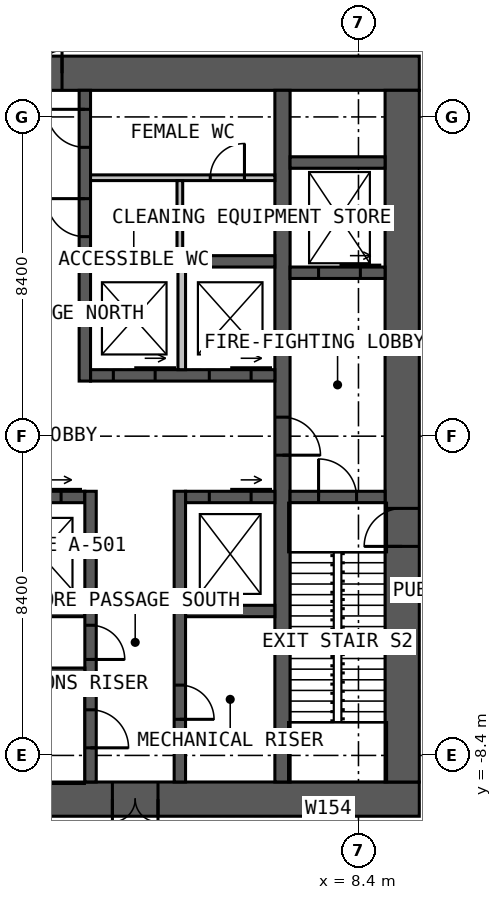
"""IFC4 building model, lengths in metres.
Left out: names, types, materials, properties, quantities, classifications, styles, units other than length and angle.
Written with IfcOpenShell. Run it as: python <this file> out.ifc"""

import sys

from ifc_helpers import new_model, si_unit, direction, frame, frame_2d, origin, place, context, subcontext, project, spatial, rectangle, extrude, element, fill, save


model = new_model("IFC4")
c1 = context("Model", 3, precision=1e-05, world=origin(), true_north=direction((0.0, 1.0)))
c2 = subcontext(c1, "Body", "Model", "MODEL_VIEW")
j1 = project(units=[si_unit("LENGTHUNIT", "METRE"), si_unit("PLANEANGLEUNIT", "RADIAN")], contexts=[c1])
p1 = place(None, origin())
s1 = spatial("IfcSite", under=j1, at=p1, CompositionType="ELEMENT")
p2 = place(p1, origin())
s2 = spatial("IfcBuilding", under=s1, at=p2, CompositionType="ELEMENT")
p3 = place(p2, origin())
s3 = spatial("IfcBuildingStorey", under=s2, at=p3, CompositionType="ELEMENT", Elevation=0.0)
p4 = place(p3, frame((-10.0, 9.55, 0.0), z_axis=(0.0, 0.0, 1.0), x_axis=(1.0, 0.0, 0.0)))
e1 = element("IfcWall", 1, at=p4, inside=s3, PredefinedType="SOLIDWALL", context=c2, shape_type="SweptSolid", body=[
    extrude(rectangle(XDim=20.0, YDim=0.9, at=frame_2d((10.0, 0.0))), origin(), (0.0, 0.0, 1.0), 6.0),
])
p5 = place(p4, frame((9.4, 0.0, 0.0)))
e2 = element("IfcOpeningElement", 2, at=p5, cuts=e1, PredefinedType="OPENING", context=c2, shape_type="SweptSolid", body=[
    extrude(rectangle(XDim=1.2, YDim=2.2, at=frame_2d((0.6, 1.1))), frame((0.0, 0.46, 0.0), z_axis=(0.0, -1.0, 0.0), x_axis=(1.0, 0.0, 0.0)), (0.0, 0.0, 1.0), 0.92),
])
p6 = place(p3, frame((10.0, -9.55, 0.0), z_axis=(0.0, 0.0, 1.0), x_axis=(-1.0, 0.0, 0.0)))
e3 = element("IfcWall", 3, at=p6, inside=s3, PredefinedType="SOLIDWALL", context=c2, shape_type="SweptSolid", body=[
    extrude(rectangle(XDim=20.0, YDim=0.9, at=frame_2d((10.0, 0.0))), origin(), (0.0, 0.0, 1.0), 6.0),
])
p7 = place(p6, frame((6.875, 0.0, 0.0)))
e4 = element("IfcOpeningElement", 4, at=p7, cuts=e3, PredefinedType="OPENING", context=c2, shape_type="SweptSolid", body=[
    extrude(rectangle(XDim=1.2, YDim=2.2, at=frame_2d((0.6, 1.1))), frame((0.0, 0.46, 0.0), z_axis=(0.0, -1.0, 0.0), x_axis=(1.0, 0.0, 0.0)), (0.0, 0.0, 1.0), 0.92),
])
p8 = place(p3, frame((9.55, -9.1, 0.0), z_axis=(0.0, 0.0, 1.0), x_axis=(0.0, 1.0, 0.0)))
e5 = element("IfcWall", 5, at=p8, inside=s3, PredefinedType="SOLIDWALL", context=c2, shape_type="SweptSolid", body=[
    extrude(rectangle(XDim=18.2, YDim=0.9, at=frame_2d((9.1, 0.0))), origin(), (0.0, 0.0, 1.0), 6.0),
])
p9 = place(p8, frame((6.2, 0.0, 0.0)))
e6 = element("IfcOpeningElement", 6, at=p9, cuts=e5, PredefinedType="OPENING", context=c2, shape_type="SweptSolid", body=[
    extrude(rectangle(XDim=1.0, YDim=2.2, at=frame_2d((0.5, 1.1))), frame((0.0, 0.46, 0.0), z_axis=(0.0, -1.0, 0.0), x_axis=(1.0, 0.0, 0.0)), (0.0, 0.0, 1.0), 0.92),
])
p10 = place(p3, frame((6.4, 9.1, 0.0), z_axis=(0.0, 0.0, 1.0), x_axis=(0.0, -1.0, 0.0)))
e7 = element("IfcWall", 7, at=p10, inside=s3, PredefinedType="SOLIDWALL", context=c2, shape_type="SweptSolid", body=[
    extrude(rectangle(XDim=18.2, YDim=0.4, at=frame_2d((9.1, 0.0))), origin(), (0.0, 0.0, 1.0), 6.0),
])
p11 = place(p10, frame((8.6, 0.0, 0.0)))
e8 = element("IfcOpeningElement", 8, at=p11, cuts=e7, PredefinedType="OPENING", context=c2, shape_type="SweptSolid", body=[
    extrude(rectangle(XDim=1.0, YDim=2.2, at=frame_2d((0.5, 1.1))), frame((0.0, 0.21, 0.0), z_axis=(0.0, -1.0, 0.0), x_axis=(1.0, 0.0, 0.0)), (0.0, 0.0, 1.0), 0.42),
])
p12 = place(p3, frame((1.35, 1.6, 0.0), z_axis=(0.0, 0.0, 1.0), x_axis=(1.0, 0.0, 0.0)))
e9 = element("IfcWall", 9, at=p12, inside=s3, PredefinedType="SOLIDWALL", context=c2, shape_type="SweptSolid", body=[
    extrude(rectangle(XDim=4.85, YDim=0.3, at=frame_2d((2.425, 0.0))), origin(), (0.0, 0.0, 1.0), 6.0),
])
p13 = place(p12, frame((0.6, 0.0, 0.0)))
e10 = element("IfcOpeningElement", 10, at=p13, cuts=e9, PredefinedType="OPENING", context=c2, shape_type="SweptSolid", body=[
    extrude(rectangle(XDim=1.1, YDim=2.2, at=frame_2d((0.55, 1.1))), frame((0.0, 0.16, 0.0), z_axis=(0.0, -1.0, 0.0), x_axis=(1.0, 0.0, 0.0)), (0.0, 0.0, 1.0), 0.32),
])
p14 = place(p12, frame((3.125, 0.0, 0.0)))
e11 = element("IfcOpeningElement", 11, at=p14, cuts=e9, PredefinedType="OPENING", context=c2, shape_type="SweptSolid", body=[
    extrude(rectangle(XDim=1.1, YDim=2.2, at=frame_2d((0.55, 1.1))), frame((0.0, 0.16, 0.0), z_axis=(0.0, -1.0, 0.0), x_axis=(1.0, 0.0, 0.0)), (0.0, 0.0, 1.0), 0.32),
])
p15 = place(p3, frame((1.35, 4.6, 0.0), z_axis=(0.0, 0.0, 1.0), x_axis=(1.0, 0.0, 0.0)))
e12 = element("IfcWall", 12, at=p15, inside=s3, PredefinedType="SOLIDWALL", context=c2, shape_type="SweptSolid", body=[
    extrude(rectangle(XDim=4.85, YDim=0.3, at=frame_2d((2.425, 0.0))), origin(), (0.0, 0.0, 1.0), 6.0),
])
p16 = place(p3, frame((1.2, 1.45, 0.0), z_axis=(0.0, 0.0, 1.0), x_axis=(0.0, 1.0, 0.0)))
e13 = element("IfcWall", 13, at=p16, inside=s3, PredefinedType="SOLIDWALL", context=c2, shape_type="SweptSolid", body=[
    extrude(rectangle(XDim=7.65, YDim=0.3, at=frame_2d((3.825, 0.0))), origin(), (0.0, 0.0, 1.0), 6.0),
])
p17 = place(p16, frame((3.8, 0.0, 0.0)))
e14 = element("IfcOpeningElement", 14, at=p17, cuts=e13, PredefinedType="OPENING", context=c2, shape_type="SweptSolid", body=[
    extrude(rectangle(XDim=1.0, YDim=2.2, at=frame_2d((0.5, 1.1))), frame((0.0, 0.16, 0.0), z_axis=(0.0, -1.0, 0.0), x_axis=(1.0, 0.0, 0.0)), (0.0, 0.0, 1.0), 0.32),
])
p18 = place(p16, frame((6.15, 0.0, 0.0)))
e15 = element("IfcOpeningElement", 15, at=p18, cuts=e13, PredefinedType="OPENING", context=c2, shape_type="SweptSolid", body=[
    extrude(rectangle(XDim=1.0, YDim=2.2, at=frame_2d((0.5, 1.1))), frame((0.0, 0.16, 0.0), z_axis=(0.0, -1.0, 0.0), x_axis=(1.0, 0.0, 0.0)), (0.0, 0.0, 1.0), 0.32),
])
p19 = place(p3, frame((-6.2, -1.6, 0.0), z_axis=(0.0, 0.0, 1.0), x_axis=(1.0, 0.0, 0.0)))
e16 = element("IfcWall", 16, at=p19, inside=s3, PredefinedType="SOLIDWALL", context=c2, shape_type="SweptSolid", body=[
    extrude(rectangle(XDim=7.4, YDim=0.3, at=frame_2d((3.7, 0.0))), origin(), (0.0, 0.0, 1.0), 6.0),
])
p20 = place(p19, frame((0.625, 0.0, 0.0)))
e17 = element("IfcOpeningElement", 17, at=p20, cuts=e16, PredefinedType="OPENING", context=c2, shape_type="SweptSolid", body=[
    extrude(rectangle(XDim=1.1, YDim=2.2, at=frame_2d((0.55, 1.1))), frame((0.0, 0.16, 0.0), z_axis=(0.0, -1.0, 0.0), x_axis=(1.0, 0.0, 0.0)), (0.0, 0.0, 1.0), 0.32),
])
p21 = place(p19, frame((3.15, 0.0, 0.0)))
e18 = element("IfcOpeningElement", 18, at=p21, cuts=e16, PredefinedType="OPENING", context=c2, shape_type="SweptSolid", body=[
    extrude(rectangle(XDim=1.1, YDim=2.2, at=frame_2d((0.55, 1.1))), frame((0.0, 0.16, 0.0), z_axis=(0.0, -1.0, 0.0), x_axis=(1.0, 0.0, 0.0)), (0.0, 0.0, 1.0), 0.32),
])
p22 = place(p19, frame((5.675, 0.0, 0.0)))
e19 = element("IfcOpeningElement", 19, at=p22, cuts=e16, PredefinedType="OPENING", context=c2, shape_type="SweptSolid", body=[
    extrude(rectangle(XDim=1.1, YDim=2.2, at=frame_2d((0.55, 1.1))), frame((0.0, 0.16, 0.0), z_axis=(0.0, -1.0, 0.0), x_axis=(1.0, 0.0, 0.0)), (0.0, 0.0, 1.0), 0.32),
])
p23 = place(p3, frame((3.85, -1.6, 0.0), z_axis=(0.0, 0.0, 1.0), x_axis=(1.0, 0.0, 0.0)))
e20 = element("IfcWall", 20, at=p23, inside=s3, PredefinedType="SOLIDWALL", context=c2, shape_type="SweptSolid", body=[
    extrude(rectangle(XDim=2.35, YDim=0.3, at=frame_2d((1.175, 0.0))), origin(), (0.0, 0.0, 1.0), 6.0),
])
p24 = place(p23, frame((0.625, 0.0, 0.0)))
e21 = element("IfcOpeningElement", 21, at=p24, cuts=e20, PredefinedType="OPENING", context=c2, shape_type="SweptSolid", body=[
    extrude(rectangle(XDim=1.1, YDim=2.2, at=frame_2d((0.55, 1.1))), frame((0.0, 0.16, 0.0), z_axis=(0.0, -1.0, 0.0), x_axis=(1.0, 0.0, 0.0)), (0.0, 0.0, 1.0), 0.32),
])
p25 = place(p3, frame((-6.2, -4.6, 0.0), z_axis=(0.0, 0.0, 1.0), x_axis=(1.0, 0.0, 0.0)))
e22 = element("IfcWall", 22, at=p25, inside=s3, PredefinedType="SOLIDWALL", context=c2, shape_type="SweptSolid", body=[
    extrude(rectangle(XDim=7.4, YDim=0.3, at=frame_2d((3.7, 0.0))), origin(), (0.0, 0.0, 1.0), 6.0),
])
p26 = place(p3, frame((3.85, -4.6, 0.0), z_axis=(0.0, 0.0, 1.0), x_axis=(1.0, 0.0, 0.0)))
e23 = element("IfcWall", 23, at=p26, inside=s3, PredefinedType="SOLIDWALL", context=c2, shape_type="SweptSolid", body=[
    extrude(rectangle(XDim=2.35, YDim=0.3, at=frame_2d((1.175, 0.0))), origin(), (0.0, 0.0, 1.0), 6.0),
])
p27 = place(p3, frame((1.35, -1.45, 0.0), z_axis=(0.0, 0.0, 1.0), x_axis=(0.0, -1.0, 0.0)))
e24 = element("IfcWall", 24, at=p27, inside=s3, PredefinedType="SOLIDWALL", context=c2, shape_type="SweptSolid", body=[
    extrude(rectangle(XDim=7.65, YDim=0.3, at=frame_2d((3.825, 0.0))), origin(), (0.0, 0.0, 1.0), 6.0),
])
p28 = place(p27, frame((5.75, 0.0, 0.0)))
e25 = element("IfcOpeningElement", 25, at=p28, cuts=e24, PredefinedType="OPENING", context=c2, shape_type="SweptSolid", body=[
    extrude(rectangle(XDim=1.0, YDim=2.2, at=frame_2d((0.5, 1.1))), frame((0.0, 0.16, 0.0), z_axis=(0.0, -1.0, 0.0), x_axis=(1.0, 0.0, 0.0)), (0.0, 0.0, 1.0), 0.32),
])
p29 = place(p27, frame((3.525, 0.0, 0.0)))
e26 = element("IfcOpeningElement", 26, at=p29, cuts=e24, PredefinedType="OPENING", context=c2, shape_type="SweptSolid", body=[
    extrude(rectangle(XDim=0.9, YDim=2.2, at=frame_2d((0.45, 1.1))), frame((0.0, 0.16, 0.0), z_axis=(0.0, -1.0, 0.0), x_axis=(1.0, 0.0, 0.0)), (0.0, 0.0, 1.0), 0.32),
])
p30 = place(p3, frame((3.7, -1.45, 0.0), z_axis=(0.0, 0.0, 1.0), x_axis=(0.0, -1.0, 0.0)))
e27 = element("IfcWall", 27, at=p30, inside=s3, PredefinedType="SOLIDWALL", context=c2, shape_type="SweptSolid", body=[
    extrude(rectangle(XDim=7.65, YDim=0.3, at=frame_2d((3.825, 0.0))), origin(), (0.0, 0.0, 1.0), 6.0),
])
p31 = place(p30, frame((5.1, 0.0, 0.0)))
e28 = element("IfcOpeningElement", 28, at=p31, cuts=e27, PredefinedType="OPENING", context=c2, shape_type="SweptSolid", body=[
    extrude(rectangle(XDim=0.9, YDim=2.2, at=frame_2d((0.45, 1.1))), frame((0.0, 0.16, 0.0), z_axis=(0.0, -1.0, 0.0), x_axis=(1.0, 0.0, 0.0)), (0.0, 0.0, 1.0), 0.32),
])
p32 = place(p3, frame((-6.2, -6.2, 0.0), z_axis=(0.0, 0.0, 1.0), x_axis=(1.0, 0.0, 0.0)))
e29 = element("IfcWall", 29, at=p32, inside=s3, PredefinedType="SOLIDWALL", context=c2, shape_type="SweptSolid", body=[
    extrude(rectangle(XDim=7.4, YDim=0.2, at=frame_2d((3.7, 0.0))), origin(), (0.0, 0.0, 1.0), 6.0),
])
p33 = place(p3, frame((6.6, -1.6, 0.0), z_axis=(0.0, 0.0, 1.0), x_axis=(1.0, 0.0, 0.0)))
e30 = element("IfcWall", 30, at=p33, inside=s3, PredefinedType="SOLIDWALL", context=c2, shape_type="SweptSolid", body=[
    extrude(rectangle(XDim=2.5, YDim=0.3, at=frame_2d((1.25, 0.0))), origin(), (0.0, 0.0, 1.0), 6.0),
])
p34 = place(p33, frame((0.75, 0.0, 0.0)))
e31 = element("IfcOpeningElement", 31, at=p34, cuts=e30, PredefinedType="OPENING", context=c2, shape_type="SweptSolid", body=[
    extrude(rectangle(XDim=1.0, YDim=2.2, at=frame_2d((0.5, 1.1))), frame((0.0, 0.16, 0.0), z_axis=(0.0, -1.0, 0.0), x_axis=(1.0, 0.0, 0.0)), (0.0, 0.0, 1.0), 0.32),
])
p35 = place(p3, frame((6.6, 4.3, 0.0), z_axis=(0.0, 0.0, 1.0), x_axis=(1.0, 0.0, 0.0)))
e32 = element("IfcWall", 32, at=p35, inside=s3, PredefinedType="SOLIDWALL", context=c2, shape_type="SweptSolid", body=[
    extrude(rectangle(XDim=2.5, YDim=0.3, at=frame_2d((1.25, 0.0))), origin(), (0.0, 0.0, 1.0), 6.0),
])
p36 = place(p35, frame((0.75, 0.0, 0.0)))
e33 = element("IfcOpeningElement", 33, at=p36, cuts=e32, PredefinedType="OPENING", context=c2, shape_type="SweptSolid", body=[
    extrude(rectangle(XDim=1.1, YDim=2.2, at=frame_2d((0.55, 1.1))), frame((0.0, 0.16, 0.0), z_axis=(0.0, -1.0, 0.0), x_axis=(1.0, 0.0, 0.0)), (0.0, 0.0, 1.0), 0.32),
])
p37 = place(p3, frame((6.6, 7.2, 0.0), z_axis=(0.0, 0.0, 1.0), x_axis=(1.0, 0.0, 0.0)))
e34 = element("IfcWall", 34, at=p37, inside=s3, PredefinedType="SOLIDWALL", context=c2, shape_type="SweptSolid", body=[
    extrude(rectangle(XDim=2.5, YDim=0.3, at=frame_2d((1.25, 0.0))), origin(), (0.0, 0.0, 1.0), 6.0),
])
p38 = place(p3, frame((3.75, 1.75, 0.0), z_axis=(0.0, 0.0, 1.0), x_axis=(0.0, 1.0, 0.0)))
e35 = element("IfcWall", 35, at=p38, inside=s3, PredefinedType="SOLIDWALL", context=c2, shape_type="SweptSolid", body=[
    extrude(rectangle(XDim=2.7, YDim=0.2, at=frame_2d((1.35, 0.0))), origin(), (0.0, 0.0, 1.0), 5.75),
])
p39 = place(p3, frame((1.35, 6.8, 0.0), z_axis=(0.0, 0.0, 1.0), x_axis=(1.0, 0.0, 0.0)))
e36 = element("IfcWall", 36, at=p39, inside=s3, PredefinedType="PARTITIONING", context=c2, shape_type="SweptSolid", body=[
    extrude(rectangle(XDim=4.85, YDim=0.15, at=frame_2d((2.425, 0.0))), origin(), (0.0, 0.0, 1.0), 5.75),
])
p40 = place(p39, frame((3.15, 0.0, 0.0)))
e37 = element("IfcOpeningElement", 37, at=p40, cuts=e36, PredefinedType="OPENING", context=c2, shape_type="SweptSolid", body=[
    extrude(rectangle(XDim=0.9, YDim=2.2, at=frame_2d((0.45, 1.1))), frame((0.0, 0.085, 0.0), z_axis=(0.0, -1.0, 0.0), x_axis=(1.0, 0.0, 0.0)), (0.0, 0.0, 1.0), 0.17),
])
p41 = place(p3, frame((3.7, 4.75, 0.0), z_axis=(0.0, 0.0, 1.0), x_axis=(0.0, 1.0, 0.0)))
e38 = element("IfcWall", 38, at=p41, inside=s3, PredefinedType="PARTITIONING", context=c2, shape_type="SweptSolid", body=[
    extrude(rectangle(XDim=1.975, YDim=0.15, at=frame_2d((0.988, 0.0))), origin(), (0.0, 0.0, 1.0), 5.75),
])
p42 = place(p5, origin())
e39 = element("IfcDoor", 39, at=p42, inside=s3, OperationType="DOUBLE_DOOR_SINGLE_SWING", PredefinedType="DOOR", context=c2, shape_type="SweptSolid", body=[
    extrude(rectangle(XDim=1.2, YDim=2.2, at=frame_2d((0.6, 1.1))), frame((0.0, 0.025, 0.0), z_axis=(0.0, -1.0, 0.0), x_axis=(1.0, 0.0, 0.0)), (0.0, 0.0, 1.0), 0.05),
])
fill(e2, e39)
p43 = place(p7, origin())
e40 = element("IfcDoor", 40, at=p43, inside=s3, OperationType="DOUBLE_DOOR_SINGLE_SWING", PredefinedType="DOOR", context=c2, shape_type="SweptSolid", body=[
    extrude(rectangle(XDim=1.2, YDim=2.2, at=frame_2d((0.6, 1.1))), frame((0.0, 0.025, 0.0), z_axis=(0.0, -1.0, 0.0), x_axis=(1.0, 0.0, 0.0)), (0.0, 0.0, 1.0), 0.05),
])
fill(e4, e40)
p44 = place(p11, origin())
e41 = element("IfcDoor", 41, at=p44, inside=s3, OperationType="SINGLE_SWING_RIGHT", PredefinedType="DOOR", context=c2, shape_type="SweptSolid", body=[
    extrude(rectangle(XDim=1.0, YDim=2.2, at=frame_2d((0.5, 1.1))), frame((0.0, 0.025, 0.0), z_axis=(0.0, -1.0, 0.0), x_axis=(1.0, 0.0, 0.0)), (0.0, 0.0, 1.0), 0.05),
])
fill(e8, e41)
p45 = place(p34, origin())
e42 = element("IfcDoor", 42, at=p45, inside=s3, OperationType="SINGLE_SWING_LEFT", PredefinedType="DOOR", context=c2, shape_type="SweptSolid", body=[
    extrude(rectangle(XDim=1.0, YDim=2.2, at=frame_2d((0.5, 1.1))), frame((0.0, 0.025, 0.0), z_axis=(0.0, -1.0, 0.0), x_axis=(1.0, 0.0, 0.0)), (0.0, 0.0, 1.0), 0.05),
])
fill(e31, e42)
p46 = place(p28, origin())
e43 = element("IfcDoor", 43, at=p46, inside=s3, OperationType="SINGLE_SWING_RIGHT", PredefinedType="DOOR", context=c2, shape_type="SweptSolid", body=[
    extrude(rectangle(XDim=1.0, YDim=2.2, at=frame_2d((0.5, 1.1))), frame((0.0, 0.025, 0.0), z_axis=(0.0, -1.0, 0.0), x_axis=(1.0, 0.0, 0.0)), (0.0, 0.0, 1.0), 0.05),
])
fill(e25, e43)
p47 = place(p9, origin())
e44 = element("IfcDoor", 44, at=p47, inside=s3, OperationType="SINGLE_SWING_LEFT", PredefinedType="DOOR", context=c2, shape_type="SweptSolid", body=[
    extrude(rectangle(XDim=1.0, YDim=2.2, at=frame_2d((0.5, 1.1))), frame((0.0, 0.025, 0.0), z_axis=(0.0, -1.0, 0.0), x_axis=(1.0, 0.0, 0.0)), (0.0, 0.0, 1.0), 0.05),
])
fill(e6, e44)
p48 = place(p17, origin())
e45 = element("IfcDoor", 45, at=p48, inside=s3, OperationType="SINGLE_SWING_RIGHT", PredefinedType="DOOR", context=c2, shape_type="SweptSolid", body=[
    extrude(rectangle(XDim=1.0, YDim=2.2, at=frame_2d((0.5, 1.1))), frame((0.0, 0.025, 0.0), z_axis=(0.0, -1.0, 0.0), x_axis=(1.0, 0.0, 0.0)), (0.0, 0.0, 1.0), 0.05),
])
fill(e14, e45)
p49 = place(p18, origin())
e46 = element("IfcDoor", 46, at=p49, inside=s3, OperationType="SINGLE_SWING_RIGHT", PredefinedType="DOOR", context=c2, shape_type="SweptSolid", body=[
    extrude(rectangle(XDim=1.0, YDim=2.2, at=frame_2d((0.5, 1.1))), frame((0.0, 0.025, 0.0), z_axis=(0.0, -1.0, 0.0), x_axis=(1.0, 0.0, 0.0)), (0.0, 0.0, 1.0), 0.05),
])
fill(e15, e46)
p50 = place(p29, origin())
e47 = element("IfcDoor", 47, at=p50, inside=s3, OperationType="SINGLE_SWING_RIGHT", PredefinedType="DOOR", context=c2, shape_type="SweptSolid", body=[
    extrude(rectangle(XDim=0.9, YDim=2.2, at=frame_2d((0.45, 1.1))), frame((0.0, 0.025, 0.0), z_axis=(0.0, -1.0, 0.0), x_axis=(1.0, 0.0, 0.0)), (0.0, 0.0, 1.0), 0.05),
])
fill(e26, e47)
p51 = place(p31, origin())
e48 = element("IfcDoor", 48, at=p51, inside=s3, OperationType="SINGLE_SWING_RIGHT", PredefinedType="DOOR", context=c2, shape_type="SweptSolid", body=[
    extrude(rectangle(XDim=0.9, YDim=2.2, at=frame_2d((0.45, 1.1))), frame((0.0, 0.025, 0.0), z_axis=(0.0, -1.0, 0.0), x_axis=(1.0, 0.0, 0.0)), (0.0, 0.0, 1.0), 0.05),
])
fill(e28, e48)
p52 = place(p40, origin())
e49 = element("IfcDoor", 49, at=p52, inside=s3, OperationType="SINGLE_SWING_RIGHT", PredefinedType="DOOR", context=c2, shape_type="SweptSolid", body=[
    extrude(rectangle(XDim=0.9, YDim=2.2, at=frame_2d((0.45, 1.1))), frame((0.0, 0.025, 0.0), z_axis=(0.0, -1.0, 0.0), x_axis=(1.0, 0.0, 0.0)), (0.0, 0.0, 1.0), 0.05),
])
fill(e37, e49)
p53 = place(p13, origin())
e50 = element("IfcDoor", 50, at=p53, inside=s3, OperationType="SLIDING_TO_LEFT", PredefinedType="DOOR", context=c2, shape_type="SweptSolid", body=[
    extrude(rectangle(XDim=1.1, YDim=2.2, at=frame_2d((0.55, 1.1))), frame((0.0, 0.025, 0.0), z_axis=(0.0, -1.0, 0.0), x_axis=(1.0, 0.0, 0.0)), (0.0, 0.0, 1.0), 0.05),
])
fill(e10, e50)
p54 = place(p14, origin())
e51 = element("IfcDoor", 51, at=p54, inside=s3, OperationType="SLIDING_TO_LEFT", PredefinedType="DOOR", context=c2, shape_type="SweptSolid", body=[
    extrude(rectangle(XDim=1.1, YDim=2.2, at=frame_2d((0.55, 1.1))), frame((0.0, 0.025, 0.0), z_axis=(0.0, -1.0, 0.0), x_axis=(1.0, 0.0, 0.0)), (0.0, 0.0, 1.0), 0.05),
])
fill(e11, e51)
p55 = place(p22, origin())
e52 = element("IfcDoor", 52, at=p55, inside=s3, OperationType="SLIDING_TO_LEFT", PredefinedType="DOOR", context=c2, shape_type="SweptSolid", body=[
    extrude(rectangle(XDim=1.1, YDim=2.2, at=frame_2d((0.55, 1.1))), frame((0.0, 0.025, 0.0), z_axis=(0.0, -1.0, 0.0), x_axis=(1.0, 0.0, 0.0)), (0.0, 0.0, 1.0), 0.05),
])
fill(e19, e52)
p56 = place(p24, origin())
e53 = element("IfcDoor", 53, at=p56, inside=s3, OperationType="SLIDING_TO_LEFT", PredefinedType="DOOR", context=c2, shape_type="SweptSolid", body=[
    extrude(rectangle(XDim=1.1, YDim=2.2, at=frame_2d((0.55, 1.1))), frame((0.0, 0.025, 0.0), z_axis=(0.0, -1.0, 0.0), x_axis=(1.0, 0.0, 0.0)), (0.0, 0.0, 1.0), 0.05),
])
fill(e21, e53)
p57 = place(p36, origin())
e54 = element("IfcDoor", 54, at=p57, inside=s3, OperationType="SLIDING_TO_LEFT", PredefinedType="DOOR", context=c2, shape_type="SweptSolid", body=[
    extrude(rectangle(XDim=1.1, YDim=2.2, at=frame_2d((0.55, 1.1))), frame((0.0, 0.025, 0.0), z_axis=(0.0, -1.0, 0.0), x_axis=(1.0, 0.0, 0.0)), (0.0, 0.0, 1.0), 0.05),
])
fill(e33, e54)
save(model, sys.argv[1])
